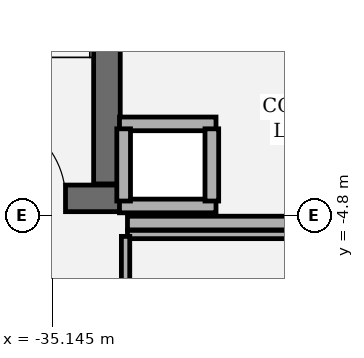
"""IFC4 building model, lengths in metres.
Left out: names, types, materials, properties, quantities, classifications, styles, units other than length and angle.
Written with IfcOpenShell. Run it as: python <this file> out.ifc"""

import sys

from ifc_helpers import new_model, si_unit, direction, frame, frame_2d, origin, place, context, subcontext, project, spatial, rectangle, extrude, element, fill, save


model = new_model("IFC4")
c1 = context("Model", 3, precision=1e-05, world=origin(), true_north=direction((0.0, 1.0)))
c2 = subcontext(c1, "Body", "Model", "MODEL_VIEW")
j1 = project(units=[si_unit("LENGTHUNIT", "METRE"), si_unit("PLANEANGLEUNIT", "RADIAN")], contexts=[c1])
p1 = place(None, origin())
s1 = spatial("IfcSite", under=j1, at=p1, CompositionType="ELEMENT")
p2 = place(p1, origin())
s2 = spatial("IfcBuilding", under=s1, at=p2, CompositionType="ELEMENT")
p3 = place(p2, frame((0.0, 0.0, 12.0)))
s3 = spatial("IfcBuildingStorey", under=s2, at=p3, CompositionType="ELEMENT", Elevation=12.0)
p4 = place(p3, frame((-13.635, -37.094, 0.0), z_axis=(0.0, 0.0, 1.0), x_axis=(-0.842602364841, 0.538536214905, 0.0)))
e1 = element("IfcWall", 1, at=p4, inside=s3, PredefinedType="SOLIDWALL", context=c2, shape_type="SweptSolid", body=[
    extrude(rectangle(XDim=60.27, YDim=0.38, at=frame_2d((30.135, 0.0))), origin(), (0.0, 0.0, 1.0), 4.74),
])
p5 = place(p4, frame((29.435, 0.0, 0.8)))
e2 = element("IfcOpeningElement", 2, at=p5, cuts=e1, PredefinedType="OPENING", context=c2, shape_type="SweptSolid", body=[
    extrude(rectangle(XDim=1.4, YDim=1.5, at=frame_2d((0.7, 0.75))), frame((0.0, 0.2, 0.0), z_axis=(0.0, -1.0, 0.0), x_axis=(1.0, 0.0, 0.0)), (0.0, 0.0, 1.0), 0.4),
])
p6 = place(p3, frame((-38.46, -4.575, 0.0), z_axis=(0.0, 0.0, 1.0), x_axis=(1.0, 0.0, 0.0)))
e3 = element("IfcWall", 3, at=p6, inside=s3, PredefinedType="SHEAR", context=c2, shape_type="SweptSolid", body=[
    extrude(rectangle(XDim=4.21, YDim=0.35, at=frame_2d((2.105, 0.0))), origin(), (0.0, 0.0, 1.0), 4.74),
])
p7 = place(p6, frame((2.39, 0.0, 0.0)))
e4 = element("IfcOpeningElement", 4, at=p7, cuts=e3, PredefinedType="OPENING", context=c2, shape_type="SweptSolid", body=[
    extrude(rectangle(XDim=1.1, YDim=2.2, at=frame_2d((0.55, 1.1))), frame((0.0, 0.185, 0.0), z_axis=(0.0, -1.0, 0.0), x_axis=(1.0, 0.0, 0.0)), (0.0, 0.0, 1.0), 0.37),
])
p8 = place(p3, frame((-34.425, -4.385, 0.0), z_axis=(0.0, 0.0, 1.0), x_axis=(0.0, 1.0, 0.0)))
e5 = element("IfcWall", 5, at=p8, inside=s3, PredefinedType="SHEAR", context=c2, shape_type="SweptSolid", body=[
    extrude(rectangle(XDim=8.77, YDim=0.35, at=frame_2d((4.385, 0.0))), origin(), (0.0, 0.0, 1.0), 4.74),
])
for number, where, z_axis, x_axis in (
    (6, (-32.99, -4.675, 0.0), (0.0, 0.0, 1.0), (-1.0, 0.0, 0.0)),
    (7, (-34.26, -3.595, 0.0), (0.0, 0.0, 1.0), (1.0, 0.0, 0.0)),
):
    element("IfcWall", number, at=place(p3, frame(where, z_axis=z_axis, x_axis=x_axis)), inside=s3, PredefinedType="PARTITIONING", context=c2, shape_type="SweptSolid", body=[
        extrude(rectangle(XDim=1.27, YDim=0.18, at=frame_2d((0.635, 0.0))), origin(), (0.0, 0.0, 1.0), 4.74),
    ])
for number, where, z_axis, x_axis in (
    (8, (-34.205, -4.61, 0.0), (0.0, 0.0, 1.0), (0.0, 1.0, 0.0)),
    (9, (-33.045, -3.66, 0.0), (0.0, 0.0, 1.0), (0.0, -1.0, 0.0)),
):
    element("IfcWall", number, at=place(p3, frame(where, z_axis=z_axis, x_axis=x_axis)), inside=s3, PredefinedType="PARTITIONING", context=c2, shape_type="SweptSolid", body=[
        extrude(rectangle(XDim=0.95, YDim=0.18, at=frame_2d((0.475, 0.0))), origin(), (0.0, 0.0, 1.0), 4.74),
    ])
p9 = place(p3, frame((-31.165, -5.05, 0.0), z_axis=(0.0, 0.0, 1.0), x_axis=(-1.0, 0.0, 0.0)))
e10 = element("IfcWall", 10, at=p9, inside=s3, PredefinedType="PARTITIONING", context=c2, shape_type="SweptSolid", body=[
    extrude(rectangle(XDim=2.99, YDim=0.11, at=frame_2d((1.495, 0.0))), origin(), (0.0, 0.0, 1.0), 4.74),
])
p10 = place(p3, frame((-34.18, -5.075, 0.0), z_axis=(0.0, 0.0, 1.0), x_axis=(0.0, -1.0, 0.0)))
e11 = element("IfcWall", 11, at=p10, inside=s3, PredefinedType="PARTITIONING", context=c2, shape_type="SweptSolid", body=[
    extrude(rectangle(XDim=3.25, YDim=0.11, at=frame_2d((1.625, 0.0))), origin(), (0.0, 0.0, 1.0), 4.74),
])
p11 = place(p10, frame((1.185, 0.0, 0.0)))
e12 = element("IfcOpeningElement", 12, at=p11, cuts=e11, PredefinedType="OPENING", context=c2, shape_type="SweptSolid", body=[
    extrude(rectangle(XDim=0.88, YDim=2.1, at=frame_2d((0.44, 1.05))), frame((0.0, 0.065, 0.0), z_axis=(0.0, -1.0, 0.0), x_axis=(1.0, 0.0, 0.0)), (0.0, 0.0, 1.0), 0.13),
])
p12 = place(p3, frame((-34.155, -4.9, 0.0), z_axis=(0.0, 0.0, 1.0), x_axis=(1.0, 0.0, 0.0)))
e13 = element("IfcWall", 13, at=p12, inside=s3, PredefinedType="PARTITIONING", context=c2, shape_type="SweptSolid", body=[
    extrude(rectangle(XDim=2.99, YDim=0.18, at=frame_2d((1.495, 0.0))), origin(), (0.0, 0.0, 1.0), 4.74),
])
p13 = place(p7, origin())
e14 = element("IfcDoor", 14, at=p13, inside=s3, OperationType="SINGLE_SWING_LEFT", PredefinedType="DOOR", context=c2, shape_type="SweptSolid", body=[
    extrude(rectangle(XDim=1.1, YDim=2.2, at=frame_2d((0.55, 1.1))), frame((0.0, 0.025, 0.0), z_axis=(0.0, -1.0, 0.0), x_axis=(1.0, 0.0, 0.0)), (0.0, 0.0, 1.0), 0.05),
])
fill(e4, e14)
save(model, sys.argv[1])
